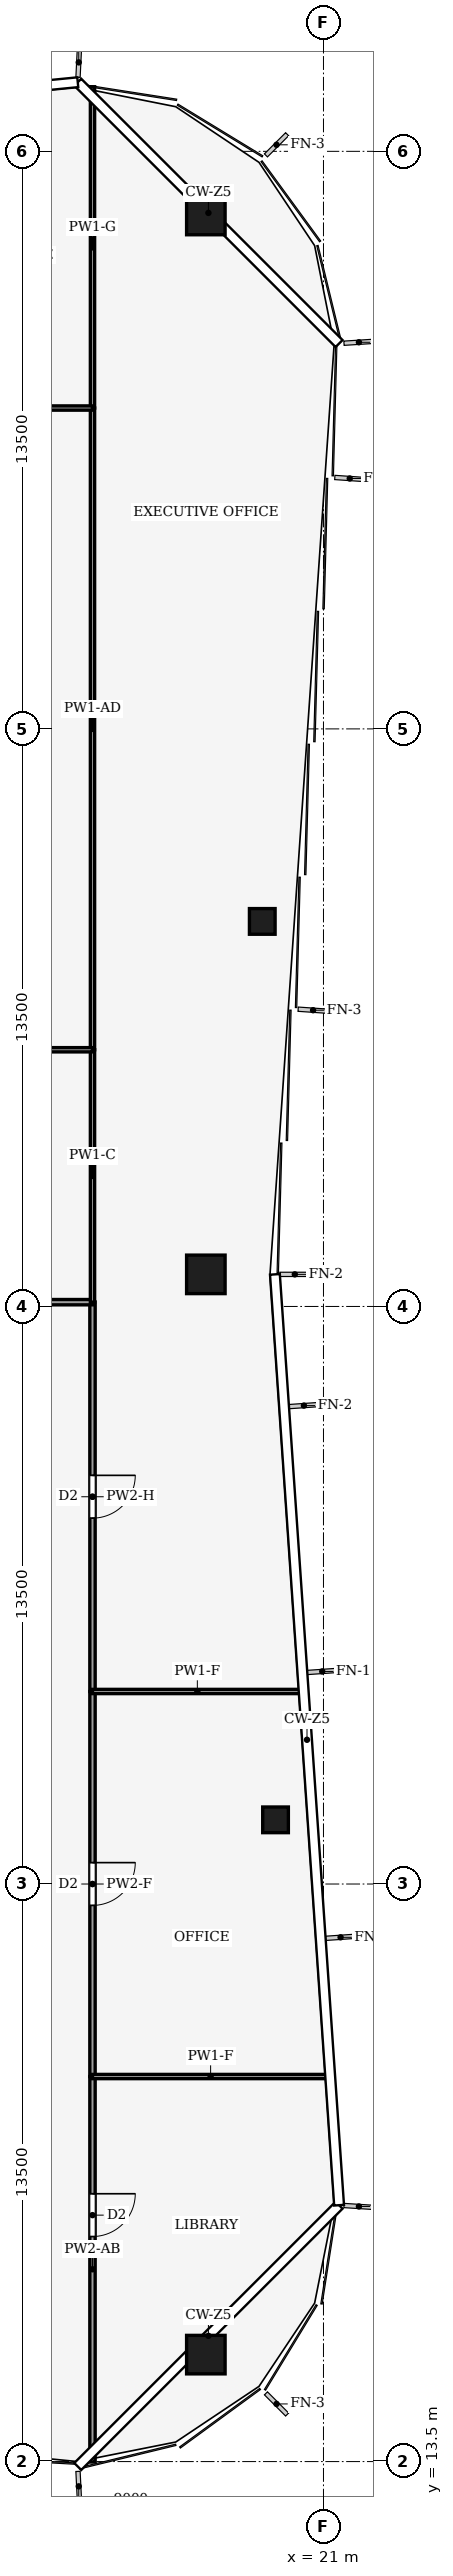
"""IFC4 building model, lengths in metres.
Left out: names, types, materials, properties, quantities, classifications, styles, units other than length and angle.
Written with IfcOpenShell. Run it as: python <this file> out.ifc"""

import sys

from ifc_helpers import new_model, si_unit, direction, frame, frame_2d, origin, origin_2d, place, context, subcontext, project, spatial, rectangle, hollow_rectangle, extrude, element, fill, save


model = new_model("IFC4")
c1 = context("Model", 3, precision=1e-05, world=origin(), true_north=direction((0.0, 1.0)))
c2 = subcontext(c1, "Body", "Model", "MODEL_VIEW")
j1 = project(units=[si_unit("LENGTHUNIT", "METRE"), si_unit("PLANEANGLEUNIT", "RADIAN")], contexts=[c1])
p1 = place(None, origin())
s1 = spatial("IfcSite", under=j1, at=p1, CompositionType="ELEMENT")
p2 = place(p1, origin())
s2 = spatial("IfcBuilding", under=s1, at=p2, CompositionType="ELEMENT")
p3 = place(p2, frame((0.0, 0.0, 318.0)))
s3 = spatial("IfcBuildingStorey", under=s2, at=p3, CompositionType="ELEMENT", Elevation=318.0)
for number, where, z_axis, x_axis in (
    (1, (18.25, 66.0, 0.0), (0.0, 0.0, 1.0), (1.0, 0.0, 0.0)),
    (2, (18.25, 41.25, 0.0), (0.0, 0.0, 1.0), (1.0, 0.0, 0.0)),
    (3, (18.25, 16.0, 0.0), (0.0, 0.0, 1.0), (1.0, 0.0, 0.0)),
):
    element("IfcColumn", number, at=place(p3, frame(where, z_axis=z_axis, x_axis=x_axis)), inside=s3, PredefinedType="COLUMN", context=c2, shape_type="SweptSolid", body=[
        extrude(hollow_rectangle(XDim=0.9, YDim=0.9, WallThickness=0.04, at=origin_2d()), origin(), (0.0, 0.0, 1.0), 4.0),
    ])
for number, where, z_axis, x_axis in (
    (4, (19.879, 28.5, 0.0), (0.0, 0.0, 1.0), (1.0, 0.0, 0.0)),
    (5, (19.569, 49.5, 0.0), (0.0, 0.0, 1.0), (1.0, 0.0, 0.0)),
):
    element("IfcColumn", number, at=place(p3, frame(where, z_axis=z_axis, x_axis=x_axis)), inside=s3, PredefinedType="COLUMN", context=c2, shape_type="SweptSolid", body=[
        extrude(hollow_rectangle(XDim=0.6, YDim=0.6, WallThickness=0.025, at=origin_2d()), origin(), (0.0, 0.0, 1.0), 4.0),
    ])
p4 = place(p3, frame((15.6, 22.5, 0.0), z_axis=(0.0, 0.0, 1.0), x_axis=(0.0, -1.0, 0.0)))
e6 = element("IfcWall", 6, at=p4, inside=s3, PredefinedType="PARTITIONING", context=c2, shape_type="SweptSolid", body=[
    extrude(rectangle(XDim=9.01, YDim=0.125, at=frame_2d((4.505, 0.0))), origin(), (0.0, 0.0, 1.0), 2.93),
])
p5 = place(p4, frame((2.74, 0.0, 0.0)))
e7 = element("IfcOpeningElement", 7, at=p5, cuts=e6, PredefinedType="OPENING", context=c2, shape_type="SweptSolid", body=[
    extrude(rectangle(XDim=1.0, YDim=2.1, at=frame_2d((0.5, 1.05))), frame((0.0, 0.073, 0.0), z_axis=(0.0, -1.0, 0.0), x_axis=(1.0, 0.0, 0.0)), (0.0, 0.0, 1.0), 0.145),
])
p6 = place(p3, frame((15.6, 31.5, 0.0), z_axis=(0.0, 0.0, 1.0), x_axis=(0.0, -1.0, 0.0)))
e8 = element("IfcWall", 8, at=p6, inside=s3, PredefinedType="PARTITIONING", context=c2, shape_type="SweptSolid", body=[
    extrude(rectangle(XDim=9.0, YDim=0.125, at=frame_2d((4.5, 0.0))), origin(), (0.0, 0.0, 1.0), 3.54),
])
p7 = place(p6, frame((4.0, 0.0, 0.0)))
e9 = element("IfcOpeningElement", 9, at=p7, cuts=e8, PredefinedType="OPENING", context=c2, shape_type="SweptSolid", body=[
    extrude(rectangle(XDim=1.0, YDim=2.1, at=frame_2d((0.5, 1.05))), frame((0.0, 0.073, 0.0), z_axis=(0.0, -1.0, 0.0), x_axis=(1.0, 0.0, 0.0)), (0.0, 0.0, 1.0), 0.145),
])
p8 = place(p3, frame((15.6, 40.604, 0.0), z_axis=(0.0, 0.0, 1.0), x_axis=(0.0, -1.0, 0.0)))
e10 = element("IfcWall", 10, at=p8, inside=s3, PredefinedType="PARTITIONING", context=c2, shape_type="SweptSolid", body=[
    extrude(rectangle(XDim=9.104, YDim=0.125, at=frame_2d((4.552, 0.0))), origin(), (0.0, 0.0, 1.0), 3.14),
])
p9 = place(p8, frame((4.052, 0.0, 0.0)))
e11 = element("IfcOpeningElement", 11, at=p9, cuts=e10, PredefinedType="OPENING", context=c2, shape_type="SweptSolid", body=[
    extrude(rectangle(XDim=1.0, YDim=2.1, at=frame_2d((0.5, 1.05))), frame((0.0, 0.073, 0.0), z_axis=(0.0, -1.0, 0.0), x_axis=(1.0, 0.0, 0.0)), (0.0, 0.0, 1.0), 0.145),
])
p10 = place(p3, frame((6.0, 40.6, 0.0), z_axis=(0.0, 0.0, 1.0), x_axis=(1.0, 0.0, 0.0)))
e12 = element("IfcWall", 12, at=p10, inside=s3, PredefinedType="PARTITIONING", context=c2, shape_type="SweptSolid", body=[
    extrude(rectangle(XDim=9.6, YDim=0.125, at=frame_2d((4.8, 0.0))), origin(), (0.0, 0.0, 1.0), 3.39),
])
p11 = place(p10, frame((4.3, 0.0, 0.0)))
e13 = element("IfcOpeningElement", 13, at=p11, cuts=e12, PredefinedType="OPENING", context=c2, shape_type="SweptSolid", body=[
    extrude(rectangle(XDim=1.0, YDim=2.1, at=frame_2d((0.5, 1.05))), frame((0.0, 0.073, 0.0), z_axis=(0.0, -1.0, 0.0), x_axis=(1.0, 0.0, 0.0)), (0.0, 0.0, 1.0), 0.145),
])
p12 = place(p3, frame((21.123, 22.5, 0.0), z_axis=(0.0, 0.0, 1.0), x_axis=(-1.0, 0.0, 0.0)))
e14 = element("IfcWall", 14, at=p12, inside=s3, PredefinedType="PARTITIONING", context=c2, shape_type="SweptSolid", body=[
    extrude(rectangle(XDim=5.523, YDim=0.1, at=frame_2d((2.761, 0.0))), origin(), (0.0, 0.0, 1.0), 3.04),
])
p13 = place(p3, frame((20.502, 31.5, 0.0), z_axis=(0.0, 0.0, 1.0), x_axis=(-1.0, 0.0, 0.0)))
e15 = element("IfcWall", 15, at=p13, inside=s3, PredefinedType="PARTITIONING", context=c2, shape_type="SweptSolid", body=[
    extrude(rectangle(XDim=4.902, YDim=0.1, at=frame_2d((2.451, 0.0))), origin(), (0.0, 0.0, 1.0), 3.04),
])
p14 = place(p3, frame((15.6, 46.5, 0.0), z_axis=(0.0, 0.0, 1.0), x_axis=(0.0, -1.0, 0.0)))
e16 = element("IfcWall", 16, at=p14, inside=s3, PredefinedType="PARTITIONING", context=c2, shape_type="SweptSolid", body=[
    extrude(rectangle(XDim=5.9, YDim=0.1, at=frame_2d((2.95, 0.0))), origin(), (0.0, 0.0, 1.0), 3.87),
])
p15 = place(p3, frame((15.6, 61.5, 0.0), z_axis=(0.0, 0.0, 1.0), x_axis=(0.0, -1.0, 0.0)))
e17 = element("IfcWall", 17, at=p15, inside=s3, PredefinedType="PARTITIONING", context=c2, shape_type="SweptSolid", body=[
    extrude(rectangle(XDim=15.0, YDim=0.1, at=frame_2d((7.5, 0.0))), origin(), (0.0, 0.0, 1.0), 3.35),
])
p16 = place(p3, frame((15.6, 69.01, 0.0), z_axis=(0.0, 0.0, 1.0), x_axis=(0.0, -1.0, 0.0)))
e18 = element("IfcWall", 18, at=p16, inside=s3, PredefinedType="PARTITIONING", context=c2, shape_type="SweptSolid", body=[
    extrude(rectangle(XDim=7.51, YDim=0.1, at=frame_2d((3.755, 0.0))), origin(), (0.0, 0.0, 1.0), 2.93),
])
p17 = place(p3, frame((15.6, 46.5, 0.0), z_axis=(0.0, 0.0, 1.0), x_axis=(-1.0, 0.0, 0.0)))
e19 = element("IfcWall", 19, at=p17, inside=s3, PredefinedType="PARTITIONING", context=c2, shape_type="SweptSolid", body=[
    extrude(rectangle(XDim=9.604, YDim=0.1, at=frame_2d((4.802, 0.0))), origin(), (0.0, 0.0, 1.0), 3.39),
])
p18 = place(p3, frame((6.0, 61.5, 0.0), z_axis=(0.0, 0.0, 1.0), x_axis=(1.0, 0.0, 0.0)))
e20 = element("IfcWall", 20, at=p18, inside=s3, PredefinedType="PARTITIONING", context=c2, shape_type="SweptSolid", body=[
    extrude(rectangle(XDim=9.6, YDim=0.1, at=frame_2d((4.8, 0.0))), origin(), (0.0, 0.0, 1.0), 3.24),
])
p19 = place(p18, frame((4.3, 0.0, 0.0)))
e21 = element("IfcOpeningElement", 21, at=p19, cuts=e20, PredefinedType="OPENING", context=c2, shape_type="SweptSolid", body=[
    extrude(rectangle(XDim=1.0, YDim=2.1, at=frame_2d((0.5, 1.05))), frame((0.0, 0.06, 0.0), z_axis=(0.0, -1.0, 0.0), x_axis=(1.0, 0.0, 0.0)), (0.0, 0.0, 1.0), 0.12),
])
p20 = place(p5, origin())
e22 = element("IfcDoor", 22, at=p20, inside=s3, OperationType="SINGLE_SWING_LEFT", PredefinedType="DOOR", context=c2, shape_type="SweptSolid", body=[
    extrude(rectangle(XDim=1.0, YDim=2.1, at=frame_2d((0.5, 1.05))), frame((0.0, 0.025, 0.0), z_axis=(0.0, -1.0, 0.0), x_axis=(1.0, 0.0, 0.0)), (0.0, 0.0, 1.0), 0.05),
])
fill(e7, e22)
p21 = place(p7, origin())
e23 = element("IfcDoor", 23, at=p21, inside=s3, OperationType="SINGLE_SWING_RIGHT", PredefinedType="DOOR", context=c2, shape_type="SweptSolid", body=[
    extrude(rectangle(XDim=1.0, YDim=2.1, at=frame_2d((0.5, 1.05))), frame((0.0, 0.025, 0.0), z_axis=(0.0, -1.0, 0.0), x_axis=(1.0, 0.0, 0.0)), (0.0, 0.0, 1.0), 0.05),
])
fill(e9, e23)
p22 = place(p9, origin())
e24 = element("IfcDoor", 24, at=p22, inside=s3, OperationType="SINGLE_SWING_LEFT", PredefinedType="DOOR", context=c2, shape_type="SweptSolid", body=[
    extrude(rectangle(XDim=1.0, YDim=2.1, at=frame_2d((0.5, 1.05))), frame((0.0, 0.025, 0.0), z_axis=(0.0, -1.0, 0.0), x_axis=(1.0, 0.0, 0.0)), (0.0, 0.0, 1.0), 0.05),
])
fill(e11, e24)
save(model, sys.argv[1])
